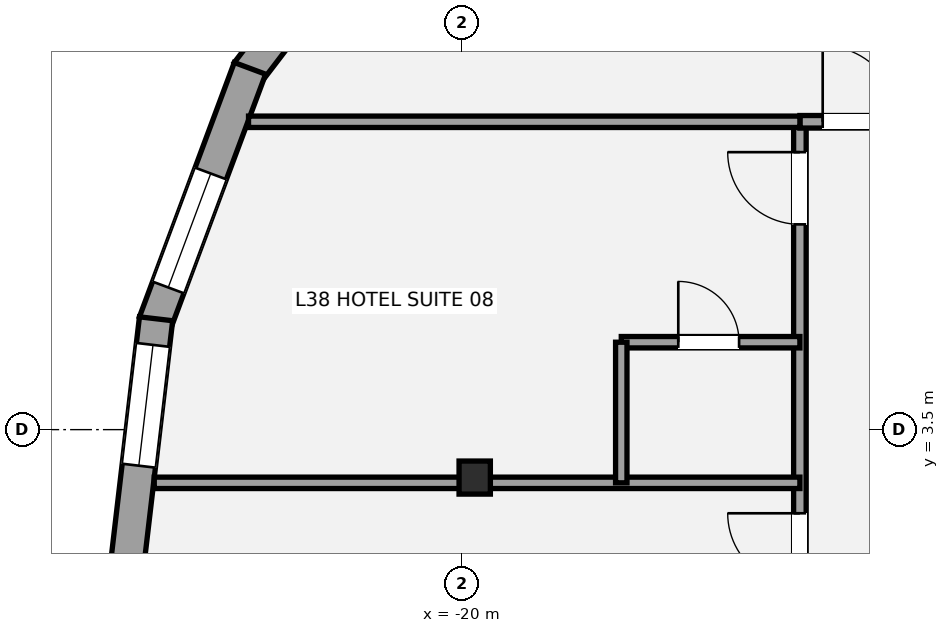
"""IFC4 building model, lengths in metres.
Left out: names, types, materials, properties, quantities, classifications, styles, units other than length and angle.
Written with IfcOpenShell. Run it as: python <this file> out.ifc"""

import sys

from ifc_helpers import new_model, si_unit, direction, frame, frame_2d, origin, origin_2d, place, context, subcontext, project, spatial, rectangle, i_section, extrude, element, fill, save


model = new_model("IFC4")
c1 = context("Model", 3, precision=1e-05, world=origin(), true_north=direction((0.0, 1.0)))
c2 = subcontext(c1, "Body", "Model", "MODEL_VIEW")
j1 = project(units=[si_unit("LENGTHUNIT", "METRE"), si_unit("PLANEANGLEUNIT", "RADIAN")], contexts=[c1])
p1 = place(None, origin())
s1 = spatial("IfcSite", under=j1, at=p1, CompositionType="ELEMENT")
p2 = place(p1, origin())
s2 = spatial("IfcBuilding", under=s1, at=p2, CompositionType="ELEMENT")
p3 = place(p2, frame((0.0, 0.0, 143.8)))
s3 = spatial("IfcBuildingStorey", under=s2, at=p3, CompositionType="ELEMENT", Elevation=143.8)
p4 = place(p3, frame((-19.828, 2.869, 0.0), z_axis=(0.0, 0.0, 1.0), x_axis=(1.0, 0.0, 0.0)))
e1 = element("IfcColumn", 1, at=p4, inside=s3, PredefinedType="COLUMN", context=c2, shape_type="SweptSolid", body=[
    extrude(i_section(OverallWidth=0.412, OverallDepth=0.435, WebThickness=0.036, FlangeThickness=0.057, at=origin_2d()), origin(), (0.0, 0.0, 1.0), 3.2),
])
p5 = place(p3, frame((-22.817, 8.196, 0.0), z_axis=(0.0, 0.0, 1.0), x_axis=(0.607215400231, 0.794537260122, 0.0)))
e2 = element("IfcWall", 2, at=p5, inside=s3, PredefinedType="STANDARD", context=c2, shape_type="SweptSolid", body=[
    extrude(rectangle(XDim=3.939, YDim=0.44, at=frame_2d((1.969, 0.0))), origin(), (0.0, 0.0, 1.0), 2.315),
])
p6 = place(p5, frame((1.592, 0.0, 0.58)))
e3 = element("IfcOpeningElement", 3, at=p6, cuts=e2, PredefinedType="OPENING", context=c2, shape_type="SweptSolid", body=[
    extrude(rectangle(XDim=1.6, YDim=1.55, at=frame_2d((0.8, 0.775))), frame((0.0, 0.23, 0.0), z_axis=(0.0, -1.0, 0.0), x_axis=(1.0, 0.0, 0.0)), (0.0, 0.0, 1.0), 0.46),
])
p7 = place(p3, frame((-24.033, 4.907, 0.0), z_axis=(0.0, 0.0, 1.0), x_axis=(0.349422124021, 0.936965409844, 0.0)))
e4 = element("IfcWall", 4, at=p7, inside=s3, PredefinedType="STANDARD", context=c2, shape_type="SweptSolid", body=[
    extrude(rectangle(XDim=3.571, YDim=0.44, at=frame_2d((1.786, 0.0))), origin(), (0.0, 0.0, 1.0), 2.315),
])
p8 = place(p7, frame((0.495, 0.0, 0.58)))
e5 = element("IfcOpeningElement", 5, at=p8, cuts=e4, PredefinedType="OPENING", context=c2, shape_type="SweptSolid", body=[
    extrude(rectangle(XDim=1.6, YDim=1.55, at=frame_2d((0.8, 0.775))), frame((0.0, 0.23, 0.0), z_axis=(0.0, -1.0, 0.0), x_axis=(1.0, 0.0, 0.0)), (0.0, 0.0, 1.0), 0.46),
])
p9 = place(p3, frame((-24.413, 1.619, 0.0), z_axis=(0.0, 0.0, 1.0), x_axis=(0.116605336518, 0.993178330158, 0.0)))
e6 = element("IfcWall", 6, at=p9, inside=s3, PredefinedType="STANDARD", context=c2, shape_type="SweptSolid", body=[
    extrude(rectangle(XDim=3.363, YDim=0.44, at=frame_2d((1.681, 0.0))), origin(), (0.0, 0.0, 1.0), 2.315),
])
p10 = place(p9, frame((1.417, 0.0, 0.58)))
e7 = element("IfcOpeningElement", 7, at=p10, cuts=e6, PredefinedType="OPENING", context=c2, shape_type="SweptSolid", body=[
    extrude(rectangle(XDim=1.6, YDim=1.55, at=frame_2d((0.8, 0.775))), frame((0.0, 0.23, 0.0), z_axis=(0.0, -1.0, 0.0), x_axis=(1.0, 0.0, 0.0)), (0.0, 0.0, 1.0), 0.46),
])
p11 = place(p3, frame((-15.55, -13.965, 0.0), z_axis=(0.0, 0.0, 1.0), x_axis=(0.0, 1.0, 0.0)))
e8 = element("IfcWall", 8, at=p11, inside=s3, PredefinedType="PARTITIONING", context=c2, shape_type="SweptSolid", body=[
    extrude(rectangle(XDim=21.515, YDim=0.165, at=frame_2d((10.757, 0.0))), origin(), (0.0, 0.0, 1.0), 2.473),
])
p12 = place(p11, frame((6.964, 0.0, 0.0)))
e9 = element("IfcOpeningElement", 9, at=p12, cuts=e8, PredefinedType="OPENING", context=c2, shape_type="SweptSolid", body=[
    extrude(rectangle(XDim=0.85, YDim=2.1, at=frame_2d((0.425, 1.05))), frame((0.0, 0.093, 0.0), z_axis=(0.0, -1.0, 0.0), x_axis=(1.0, 0.0, 0.0)), (0.0, 0.0, 1.0), 0.185),
])
p13 = place(p11, frame((11.014, 0.0, 0.0)))
e10 = element("IfcOpeningElement", 10, at=p13, cuts=e8, PredefinedType="OPENING", context=c2, shape_type="SweptSolid", body=[
    extrude(rectangle(XDim=0.95, YDim=2.15, at=frame_2d((0.475, 1.075))), frame((0.0, 0.093, 0.0), z_axis=(0.0, -1.0, 0.0), x_axis=(1.0, 0.0, 0.0)), (0.0, 0.0, 1.0), 0.185),
])
p14 = place(p11, frame((15.414, 0.0, 0.0)))
e11 = element("IfcOpeningElement", 11, at=p14, cuts=e8, PredefinedType="OPENING", context=c2, shape_type="SweptSolid", body=[
    extrude(rectangle(XDim=0.95, YDim=2.15, at=frame_2d((0.475, 1.075))), frame((0.0, 0.093, 0.0), z_axis=(0.0, -1.0, 0.0), x_axis=(1.0, 0.0, 0.0)), (0.0, 0.0, 1.0), 0.185),
])
p15 = place(p11, frame((20.165, 0.0, 0.0)))
e12 = element("IfcOpeningElement", 12, at=p15, cuts=e8, PredefinedType="OPENING", context=c2, shape_type="SweptSolid", body=[
    extrude(rectangle(XDim=0.95, YDim=2.15, at=frame_2d((0.475, 1.075))), frame((0.0, 0.093, 0.0), z_axis=(0.0, -1.0, 0.0), x_axis=(1.0, 0.0, 0.0)), (0.0, 0.0, 1.0), 0.185),
])
p16 = place(p3, frame((-15.55, 7.55, 0.0), z_axis=(0.0, 0.0, 1.0), x_axis=(1.0, 0.0, 0.0)))
e13 = element("IfcWall", 13, at=p16, inside=s3, PredefinedType="PARTITIONING", context=c2, shape_type="SweptSolid", body=[
    extrude(rectangle(XDim=1.75, YDim=0.165, at=frame_2d((0.875, 0.0))), origin(), (0.0, 0.0, 1.0), 2.473),
])
p17 = place(p16, frame((0.3, 0.0, 0.0)))
e14 = element("IfcOpeningElement", 14, at=p17, cuts=e13, PredefinedType="OPENING", context=c2, shape_type="SweptSolid", body=[
    extrude(rectangle(XDim=1.0, YDim=2.15, at=frame_2d((0.5, 1.075))), frame((0.0, 0.093, 0.0), z_axis=(0.0, -1.0, 0.0), x_axis=(1.0, 0.0, 0.0)), (0.0, 0.0, 1.0), 0.185),
])
p18 = place(p3, frame((-22.804, 7.55, 0.0), z_axis=(0.0, 0.0, 1.0), x_axis=(1.0, 0.0, 0.0)))
e15 = element("IfcWall", 15, at=p18, inside=s3, PredefinedType="PLUMBINGWALL", context=c2, shape_type="SweptSolid", body=[
    extrude(rectangle(XDim=7.254, YDim=0.15, at=frame_2d((3.627, 0.0))), origin(), (0.0, 0.0, 1.0), 2.473),
])
p19 = place(p3, frame((-24.045, 2.8, 0.0), z_axis=(0.0, 0.0, 1.0), x_axis=(1.0, 0.0, 0.0)))
e16 = element("IfcWall", 16, at=p19, inside=s3, PredefinedType="PLUMBINGWALL", context=c2, shape_type="SweptSolid", body=[
    extrude(rectangle(XDim=8.495, YDim=0.15, at=frame_2d((4.247, 0.0))), origin(), (0.0, 0.0, 1.0), 2.473),
])
p20 = place(p3, frame((-17.9, 4.65, 0.0), z_axis=(0.0, 0.0, 1.0), x_axis=(1.0, 0.0, 0.0)))
e17 = element("IfcWall", 17, at=p20, inside=s3, PredefinedType="PLUMBINGWALL", context=c2, shape_type="SweptSolid", body=[
    extrude(rectangle(XDim=2.35, YDim=0.15, at=frame_2d((1.175, 0.0))), origin(), (0.0, 0.0, 1.0), 2.473),
])
p21 = place(p20, frame((0.75, 0.0, 0.0)))
e18 = element("IfcOpeningElement", 18, at=p21, cuts=e17, PredefinedType="OPENING", context=c2, shape_type="SweptSolid", body=[
    extrude(rectangle(XDim=0.8, YDim=2.1, at=frame_2d((0.4, 1.05))), frame((0.0, 0.085, 0.0), z_axis=(0.0, -1.0, 0.0), x_axis=(1.0, 0.0, 0.0)), (0.0, 0.0, 1.0), 0.17),
])
p22 = place(p3, frame((-17.9, 2.8, 0.0), z_axis=(0.0, 0.0, 1.0), x_axis=(0.0, 1.0, 0.0)))
e19 = element("IfcWall", 19, at=p22, inside=s3, PredefinedType="PLUMBINGWALL", context=c2, shape_type="SweptSolid", body=[
    extrude(rectangle(XDim=1.85, YDim=0.15, at=frame_2d((0.925, 0.0))), origin(), (0.0, 0.0, 1.0), 3.02),
])
p23 = place(p8, origin())
e20 = element("IfcWindow", 20, at=p23, inside=s3, PartitioningType="SINGLE_PANEL", PredefinedType="WINDOW", context=c2, shape_type="SweptSolid", body=[
    extrude(rectangle(XDim=1.6, YDim=1.55, at=frame_2d((0.8, 0.775))), frame((0.0, -0.01, 0.0), z_axis=(0.0, -1.0, 0.0), x_axis=(1.0, 0.0, 0.0)), (0.0, 0.0, 1.0), 0.06),
])
fill(e5, e20)
p24 = place(p10, origin())
e21 = element("IfcWindow", 21, at=p24, inside=s3, PartitioningType="SINGLE_PANEL", PredefinedType="WINDOW", context=c2, shape_type="SweptSolid", body=[
    extrude(rectangle(XDim=1.6, YDim=1.55, at=frame_2d((0.8, 0.775))), frame((0.0, -0.01, 0.0), z_axis=(0.0, -1.0, 0.0), x_axis=(1.0, 0.0, 0.0)), (0.0, 0.0, 1.0), 0.06),
])
fill(e7, e21)
p25 = place(p17, origin())
e22 = element("IfcDoor", 22, at=p25, inside=s3, OperationType="SINGLE_SWING_LEFT", PredefinedType="DOOR", context=c2, shape_type="SweptSolid", body=[
    extrude(rectangle(XDim=1.0, YDim=2.15, at=frame_2d((0.5, 1.075))), frame((0.0, 0.025, 0.0), z_axis=(0.0, -1.0, 0.0), x_axis=(1.0, 0.0, 0.0)), (0.0, 0.0, 1.0), 0.05),
])
fill(e14, e22)
p26 = place(p14, origin())
e23 = element("IfcDoor", 23, at=p26, inside=s3, OperationType="SINGLE_SWING_RIGHT", PredefinedType="DOOR", context=c2, shape_type="SweptSolid", body=[
    extrude(rectangle(XDim=0.95, YDim=2.15, at=frame_2d((0.475, 1.075))), frame((0.0, 0.025, 0.0), z_axis=(0.0, -1.0, 0.0), x_axis=(1.0, 0.0, 0.0)), (0.0, 0.0, 1.0), 0.05),
])
fill(e11, e23)
p27 = place(p15, origin())
e24 = element("IfcDoor", 24, at=p27, inside=s3, OperationType="SINGLE_SWING_RIGHT", PredefinedType="DOOR", context=c2, shape_type="SweptSolid", body=[
    extrude(rectangle(XDim=0.95, YDim=2.15, at=frame_2d((0.475, 1.075))), frame((0.0, 0.025, 0.0), z_axis=(0.0, -1.0, 0.0), x_axis=(1.0, 0.0, 0.0)), (0.0, 0.0, 1.0), 0.05),
])
fill(e12, e24)
p28 = place(p21, origin())
e25 = element("IfcDoor", 25, at=p28, inside=s3, OperationType="SINGLE_SWING_LEFT", PredefinedType="DOOR", context=c2, shape_type="SweptSolid", body=[
    extrude(rectangle(XDim=0.8, YDim=2.1, at=frame_2d((0.4, 1.05))), frame((0.0, 0.025, 0.0), z_axis=(0.0, -1.0, 0.0), x_axis=(1.0, 0.0, 0.0)), (0.0, 0.0, 1.0), 0.05),
])
fill(e18, e25)
save(model, sys.argv[1])
